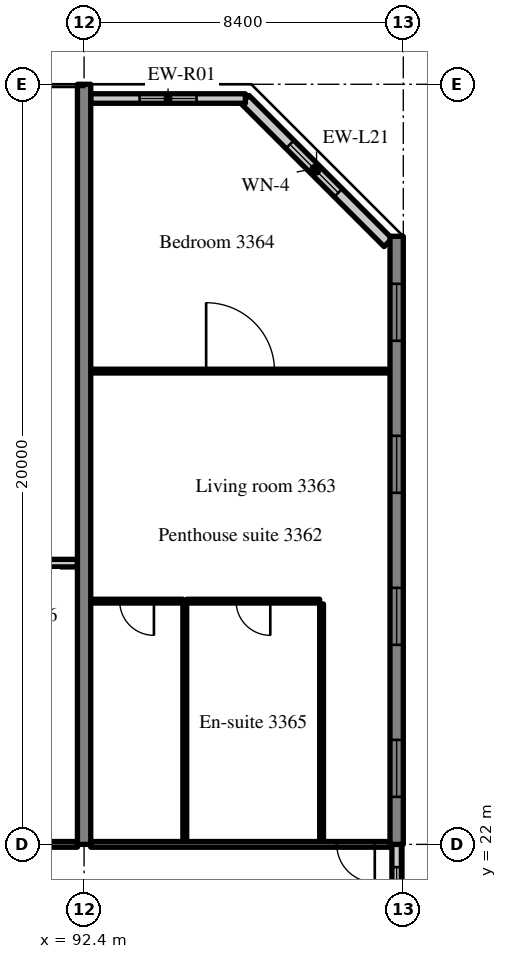
"""IFC4 building model, lengths in metres.
Left out: names, types, materials, properties, quantities, classifications, styles, units other than length and angle.
Written with IfcOpenShell. Run it as: python <this file> out.ifc"""

import sys

from ifc_helpers import new_model, si_unit, direction, frame, frame_2d, origin, place, context, subcontext, project, spatial, rectangle, extrude, source, transform, mapped, element, fill, save


model = new_model("IFC4")
c1 = context("Model", 3, precision=1e-05, world=origin(), true_north=direction((0.0, 1.0)))
c2 = subcontext(c1, "Body", "Model", "MODEL_VIEW")
j1 = project(units=[si_unit("LENGTHUNIT", "METRE"), si_unit("PLANEANGLEUNIT", "RADIAN")], contexts=[c1])
p1 = place(None, origin())
s1 = spatial("IfcSite", under=j1, at=p1, CompositionType="ELEMENT")
p2 = place(p1, origin())
s2 = spatial("IfcBuilding", under=s1, at=p2, CompositionType="ELEMENT")
p3 = place(p2, frame((0.0, 0.0, 137.0)))
s3 = spatial("IfcBuildingStorey", under=s2, at=p3, CompositionType="ELEMENT", Elevation=137.0)
m1 = source(origin(), c2, "Body", "SweptSolid", [
    extrude(rectangle(XDim=20.0, YDim=0.35, at=frame_2d((10.0, 0.0))), origin(), (0.0, 0.0, 1.0), 3.52),
])
p4 = place(p3, frame((92.4, 22.0, 0.0), z_axis=(0.0, 0.0, 1.0), x_axis=(0.0, 1.0, 0.0)))
e1 = element("IfcWall", 1, at=p4, inside=s3, PredefinedType="SHEAR", context=c2, shape_type="MappedRepresentation", body=[
    mapped(m1, transform((0.0, 0.0, 0.0), scale=1.0)),
])
m2 = source(origin(), c2, "Body", "SweptSolid", [
    extrude(rectangle(XDim=16.0, YDim=0.35, at=frame_2d((8.0, 0.0))), origin(), (0.0, 0.0, 1.0), 3.52),
])
p5 = place(p3, frame((100.625, 22.0, 0.0), z_axis=(0.0, 0.0, 1.0), x_axis=(0.0, 1.0, 0.0)))
e2 = element("IfcWall", 2, at=p5, inside=s3, PredefinedType="SHEAR", context=c2, shape_type="MappedRepresentation", body=[
    mapped(m2, transform((0.0, 0.0, 0.0), scale=1.0)),
])
m3 = source(origin(), c2, "Body", "SweptSolid", [
    extrude(rectangle(XDim=1.5, YDim=1.5, at=frame_2d((0.75, 0.75))), frame((0.0, 0.185, 0.0), z_axis=(0.0, -1.0, 0.0), x_axis=(1.0, 0.0, 0.0)), (0.0, 0.0, 1.0), 0.37),
])
p6 = place(p5, frame((1.25, 0.0, 0.9)))
e3 = element("IfcOpeningElement", 3, at=p6, cuts=e2, PredefinedType="OPENING", context=c2, shape_type="MappedRepresentation", body=[
    mapped(m3, transform((0.0, 0.0, 0.0), scale=1.0)),
])
p7 = place(p5, frame((5.25, 0.0, 0.9)))
e4 = element("IfcOpeningElement", 4, at=p7, cuts=e2, PredefinedType="OPENING", context=c2, shape_type="MappedRepresentation", body=[
    mapped(m3, transform((0.0, 0.0, 0.0), scale=1.0)),
])
p8 = place(p5, frame((9.25, 0.0, 0.9)))
e5 = element("IfcOpeningElement", 5, at=p8, cuts=e2, PredefinedType="OPENING", context=c2, shape_type="MappedRepresentation", body=[
    mapped(m3, transform((0.0, 0.0, 0.0), scale=1.0)),
])
p9 = place(p5, frame((13.25, 0.0, 0.9)))
e6 = element("IfcOpeningElement", 6, at=p9, cuts=e2, PredefinedType="OPENING", context=c2, shape_type="MappedRepresentation", body=[
    mapped(m3, transform((0.0, 0.0, 0.0), scale=1.0)),
])
m4 = source(origin(), c2, "Body", "SweptSolid", [
    extrude(rectangle(XDim=5.326, YDim=0.3, at=frame_2d((2.663, 0.0))), origin(), (0.0, 0.0, 1.0), 3.52),
])
p10 = place(p3, frame((100.4, 37.834, 0.0), z_axis=(0.0, 0.0, 1.0), x_axis=(-0.707083859269, 0.707129702361, 0.0)))
e7 = element("IfcWall", 7, at=p10, inside=s3, PredefinedType="SOLIDWALL", context=c2, shape_type="MappedRepresentation", body=[
    mapped(m4, transform((0.0, 0.0, 0.0), scale=1.0)),
])
m5 = source(origin(), c2, "Body", "SweptSolid", [
    extrude(rectangle(XDim=1.8, YDim=1.5, at=frame_2d((0.9, 0.75))), frame((0.0, 0.16, 0.0), z_axis=(0.0, -1.0, 0.0), x_axis=(1.0, 0.0, 0.0)), (0.0, 0.0, 1.0), 0.32),
])
p11 = place(p10, frame((1.854, 0.0, 0.9)))
e8 = element("IfcOpeningElement", 8, at=p11, cuts=e7, PredefinedType="OPENING", context=c2, shape_type="MappedRepresentation", body=[
    mapped(m5, transform((0.0, 0.0, 0.0), scale=1.0)),
])
m6 = source(origin(), c2, "Body", "SweptSolid", [
    extrude(rectangle(XDim=4.07, YDim=0.25, at=frame_2d((2.035, 0.0))), origin(), (0.0, 0.0, 1.0), 2.82),
])
p12 = place(p3, frame((96.645, 41.625, 0.0), z_axis=(0.0, 0.0, 1.0), x_axis=(-1.0, 0.0, 0.0)))
e9 = element("IfcWall", 9, at=p12, inside=s3, PredefinedType="SOLIDWALL", context=c2, shape_type="MappedRepresentation", body=[
    mapped(m6, transform((0.0, 0.0, 0.0), scale=1.0)),
])
m7 = source(origin(), c2, "Body", "SweptSolid", [
    extrude(rectangle(XDim=1.5, YDim=1.5, at=frame_2d((0.75, 0.75))), frame((0.0, 0.135, 0.0), z_axis=(0.0, -1.0, 0.0), x_axis=(1.0, 0.0, 0.0)), (0.0, 0.0, 1.0), 0.27),
])
p13 = place(p12, frame((1.285, 0.0, 0.9)))
e10 = element("IfcOpeningElement", 10, at=p13, cuts=e9, PredefinedType="OPENING", context=c2, shape_type="MappedRepresentation", body=[
    mapped(m7, transform((0.0, 0.0, 0.0), scale=1.0)),
])
m8 = source(origin(), c2, "Body", "SweptSolid", [
    extrude(rectangle(XDim=2.4, YDim=0.25, at=frame_2d((1.2, 0.0))), origin(), (0.0, 0.0, 1.0), 2.62),
])
p14 = place(p3, frame((100.625, 19.6, 0.0), z_axis=(0.0, 0.0, 1.0), x_axis=(0.0, 1.0, 0.0)))
e11 = element("IfcWall", 11, at=p14, inside=s3, PredefinedType="SOLIDWALL", context=c2, shape_type="MappedRepresentation", body=[
    mapped(m8, transform((0.0, 0.0, 0.0), scale=1.0)),
])
m9 = source(origin(), c2, "Body", "SweptSolid", [
    extrude(rectangle(XDim=1.2, YDim=1.5, at=frame_2d((0.6, 0.75))), frame((0.0, 0.135, 0.0), z_axis=(0.0, -1.0, 0.0), x_axis=(1.0, 0.0, 0.0)), (0.0, 0.0, 1.0), 0.27),
])
p15 = place(p14, frame((0.6, 0.0, 0.9)))
e12 = element("IfcOpeningElement", 12, at=p15, cuts=e11, PredefinedType="OPENING", context=c2, shape_type="MappedRepresentation", body=[
    mapped(m9, transform((0.0, 0.0, 0.0), scale=1.0)),
])
m10 = source(origin(), c2, "Body", "SweptSolid", [
    extrude(rectangle(XDim=8.05, YDim=0.15, at=frame_2d((4.025, 0.0))), origin(), (0.0, 0.0, 1.0), 2.82),
])
p16 = place(p3, frame((84.175, 22.0, 0.0), z_axis=(0.0, 0.0, 1.0), x_axis=(1.0, 0.0, 0.0)))
e13 = element("IfcWall", 13, at=p16, inside=s3, PredefinedType="PARTITIONING", context=c2, shape_type="MappedRepresentation", body=[
    mapped(m10, transform((0.0, 0.0, 0.0), scale=1.0)),
])
m11 = source(origin(), c2, "Body", "SweptSolid", [
    extrude(rectangle(XDim=1.8, YDim=2.1, at=frame_2d((0.9, 1.05))), frame((0.0, 0.085, 0.0), z_axis=(0.0, -1.0, 0.0), x_axis=(1.0, 0.0, 0.0)), (0.0, 0.0, 1.0), 0.17),
])
p17 = place(p16, frame((3.125, 0.0, 0.0)))
e14 = element("IfcOpeningElement", 14, at=p17, cuts=e13, PredefinedType="OPENING", context=c2, shape_type="MappedRepresentation", body=[
    mapped(m11, transform((0.0, 0.0, 0.0), scale=1.0)),
])
m12 = source(origin(), c2, "Body", "SweptSolid", [
    extrude(rectangle(XDim=8.05, YDim=0.2, at=frame_2d((4.025, 0.0))), origin(), (0.0, 0.0, 1.0), 3.52),
])
p18 = place(p3, frame((84.175, 29.4, 0.0), z_axis=(0.0, 0.0, 1.0), x_axis=(1.0, 0.0, 0.0)))
e15 = element("IfcWall", 15, at=p18, inside=s3, PredefinedType="PARTITIONING", context=c2, shape_type="MappedRepresentation", body=[
    mapped(m12, transform((0.0, 0.0, 0.0), scale=1.0)),
])
m13 = source(origin(), c2, "Body", "SweptSolid", [
    extrude(rectangle(XDim=6.25, YDim=0.1, at=frame_2d((3.125, 0.0))), origin(), (0.0, 0.0, 1.0), 3.52),
])
for number, where, z_axis, x_axis in (
    (16, (98.65, 22.075, 0.0), (0.0, 0.0, 1.0), (0.0, 1.0, 0.0)),
    (17, (95.05, 22.075, 0.0), (0.0, 0.0, 1.0), (0.0, 1.0, 0.0)),
):
    element("IfcWall", number, at=place(p3, frame(where, z_axis=z_axis, x_axis=x_axis)), inside=s3, PredefinedType="PARTITIONING", context=c2, shape_type="MappedRepresentation", body=[
        mapped(m13, transform((0.0, 0.0, 0.0), scale=1.0)),
    ])
m14 = source(origin(), c2, "Body", "SweptSolid", [
    extrude(rectangle(XDim=3.5, YDim=0.1, at=frame_2d((1.75, 0.0))), origin(), (0.0, 0.0, 1.0), 3.52),
])
p19 = place(p3, frame((95.1, 28.4, 0.0), z_axis=(0.0, 0.0, 1.0), x_axis=(1.0, 0.0, 0.0)))
e18 = element("IfcWall", 18, at=p19, inside=s3, PredefinedType="PARTITIONING", context=c2, shape_type="MappedRepresentation", body=[
    mapped(m14, transform((0.0, 0.0, 0.0), scale=1.0)),
])
m15 = source(origin(), c2, "Body", "SweptSolid", [
    extrude(rectangle(XDim=0.9, YDim=2.1, at=frame_2d((0.45, 1.05))), frame((0.0, 0.06, 0.0), z_axis=(0.0, -1.0, 0.0), x_axis=(1.0, 0.0, 0.0)), (0.0, 0.0, 1.0), 0.12),
])
p20 = place(p19, frame((1.3, 0.0, 0.0)))
e19 = element("IfcOpeningElement", 19, at=p20, cuts=e18, PredefinedType="OPENING", context=c2, shape_type="MappedRepresentation", body=[
    mapped(m15, transform((0.0, 0.0, 0.0), scale=1.0)),
])
m16 = source(origin(), c2, "Body", "SweptSolid", [
    extrude(rectangle(XDim=2.425, YDim=0.1, at=frame_2d((1.212, 0.0))), origin(), (0.0, 0.0, 1.0), 3.52),
])
p21 = place(p3, frame((92.575, 28.4, 0.0), z_axis=(0.0, 0.0, 1.0), x_axis=(1.0, 0.0, 0.0)))
e20 = element("IfcWall", 20, at=p21, inside=s3, PredefinedType="PARTITIONING", context=c2, shape_type="MappedRepresentation", body=[
    mapped(m16, transform((0.0, 0.0, 0.0), scale=1.0)),
])
p22 = place(p21, frame((0.763, 0.0, 0.0)))
e21 = element("IfcOpeningElement", 21, at=p22, cuts=e20, PredefinedType="OPENING", context=c2, shape_type="MappedRepresentation", body=[
    mapped(m15, transform((0.0, 0.0, 0.0), scale=1.0)),
])
m17 = source(origin(), c2, "Body", "SweptSolid", [
    extrude(rectangle(XDim=7.875, YDim=0.1, at=frame_2d((3.938, 0.0))), origin(), (0.0, 0.0, 1.0), 3.52),
])
p23 = place(p3, frame((92.575, 34.453, 0.0), z_axis=(0.0, 0.0, 1.0), x_axis=(1.0, 0.0, 0.0)))
e22 = element("IfcWall", 22, at=p23, inside=s3, PredefinedType="PARTITIONING", context=c2, shape_type="MappedRepresentation", body=[
    mapped(m17, transform((0.0, 0.0, 0.0), scale=1.0)),
])
m18 = source(origin(), c2, "Body", "SweptSolid", [
    extrude(rectangle(XDim=1.8, YDim=2.1, at=frame_2d((0.9, 1.05))), frame((0.0, 0.06, 0.0), z_axis=(0.0, -1.0, 0.0), x_axis=(1.0, 0.0, 0.0)), (0.0, 0.0, 1.0), 0.12),
])
p24 = place(p23, frame((3.037, 0.0, 0.0)))
e23 = element("IfcOpeningElement", 23, at=p24, cuts=e22, PredefinedType="OPENING", context=c2, shape_type="MappedRepresentation", body=[
    mapped(m18, transform((0.0, 0.0, 0.0), scale=1.0)),
])
m19 = source(origin(), c2, "Body", "SweptSolid", [
    extrude(rectangle(XDim=7.875, YDim=0.15, at=frame_2d((3.938, 0.0))), origin(), (0.0, 0.0, 1.0), 2.82),
])
p25 = place(p3, frame((92.575, 22.0, 0.0), z_axis=(0.0, 0.0, 1.0), x_axis=(1.0, 0.0, 0.0)))
e24 = element("IfcWall", 24, at=p25, inside=s3, PredefinedType="PARTITIONING", context=c2, shape_type="MappedRepresentation", body=[
    mapped(m19, transform((0.0, 0.0, 0.0), scale=1.0)),
])
m20 = source(origin(), c2, "Body", "SweptSolid", [
    extrude(rectangle(XDim=1.0, YDim=2.1, at=frame_2d((0.5, 1.05))), frame((0.0, 0.085, 0.0), z_axis=(0.0, -1.0, 0.0), x_axis=(1.0, 0.0, 0.0)), (0.0, 0.0, 1.0), 0.17),
])
p26 = place(p25, frame((6.475, 0.0, 0.0)))
e25 = element("IfcOpeningElement", 25, at=p26, cuts=e24, PredefinedType="OPENING", context=c2, shape_type="MappedRepresentation", body=[
    mapped(m20, transform((0.0, 0.0, 0.0), scale=1.0)),
])
m21 = source(origin(), c2, "Body", "SweptSolid", [
    extrude(rectangle(XDim=1.8, YDim=1.5, at=frame_2d((0.9, 0.75))), frame((0.0, 0.03, 0.0), z_axis=(0.0, -1.0, 0.0), x_axis=(1.0, 0.0, 0.0)), (0.0, 0.0, 1.0), 0.06),
])
p27 = place(p11, origin())
e26 = element("IfcWindow", 26, at=p27, inside=s3, PartitioningType="SINGLE_PANEL", PredefinedType="WINDOW", context=c2, shape_type="MappedRepresentation", body=[
    mapped(m21, transform((0.0, 0.0, 0.0), scale=1.0)),
])
fill(e8, e26)
m22 = source(origin(), c2, "Body", "SweptSolid", [
    extrude(rectangle(XDim=1.5, YDim=1.5, at=frame_2d((0.75, 0.75))), frame((0.0, 0.03, 0.0), z_axis=(0.0, -1.0, 0.0), x_axis=(1.0, 0.0, 0.0)), (0.0, 0.0, 1.0), 0.06),
])
p28 = place(p13, origin())
e27 = element("IfcWindow", 27, at=p28, inside=s3, PartitioningType="SINGLE_PANEL", PredefinedType="WINDOW", context=c2, shape_type="MappedRepresentation", body=[
    mapped(m22, transform((0.0, 0.0, 0.0), scale=1.0)),
])
fill(e10, e27)
p29 = place(p6, origin())
e28 = element("IfcWindow", 28, at=p29, inside=s3, PartitioningType="SINGLE_PANEL", PredefinedType="WINDOW", context=c2, shape_type="MappedRepresentation", body=[
    mapped(m22, transform((0.0, 0.0, 0.0), scale=1.0)),
])
fill(e3, e28)
p30 = place(p7, origin())
e29 = element("IfcWindow", 29, at=p30, inside=s3, PartitioningType="SINGLE_PANEL", PredefinedType="WINDOW", context=c2, shape_type="MappedRepresentation", body=[
    mapped(m22, transform((0.0, 0.0, 0.0), scale=1.0)),
])
fill(e4, e29)
p31 = place(p8, origin())
e30 = element("IfcWindow", 30, at=p31, inside=s3, PartitioningType="SINGLE_PANEL", PredefinedType="WINDOW", context=c2, shape_type="MappedRepresentation", body=[
    mapped(m22, transform((0.0, 0.0, 0.0), scale=1.0)),
])
fill(e5, e30)
p32 = place(p9, origin())
e31 = element("IfcWindow", 31, at=p32, inside=s3, PartitioningType="SINGLE_PANEL", PredefinedType="WINDOW", context=c2, shape_type="MappedRepresentation", body=[
    mapped(m22, transform((0.0, 0.0, 0.0), scale=1.0)),
])
fill(e6, e31)
m23 = source(origin(), c2, "Body", "SweptSolid", [
    extrude(rectangle(XDim=1.2, YDim=1.5, at=frame_2d((0.6, 0.75))), frame((0.0, 0.03, 0.0), z_axis=(0.0, -1.0, 0.0), x_axis=(1.0, 0.0, 0.0)), (0.0, 0.0, 1.0), 0.06),
])
p33 = place(p15, origin())
e32 = element("IfcWindow", 32, at=p33, inside=s3, PartitioningType="SINGLE_PANEL", PredefinedType="WINDOW", context=c2, shape_type="MappedRepresentation", body=[
    mapped(m23, transform((0.0, 0.0, 0.0), scale=1.0)),
])
fill(e12, e32)
m24 = source(origin(), c2, "Body", "SweptSolid", [
    extrude(rectangle(XDim=0.9, YDim=2.1, at=frame_2d((0.45, 1.05))), frame((0.0, 0.025, 0.0), z_axis=(0.0, -1.0, 0.0), x_axis=(1.0, 0.0, 0.0)), (0.0, 0.0, 1.0), 0.05),
])
p34 = place(p20, origin())
e33 = element("IfcDoor", 33, at=p34, inside=s3, OperationType="SINGLE_SWING_RIGHT", PredefinedType="DOOR", context=c2, shape_type="MappedRepresentation", body=[
    mapped(m24, transform((0.0, 0.0, 0.0), scale=1.0)),
])
fill(e19, e33)
p35 = place(p22, origin())
e34 = element("IfcDoor", 34, at=p35, inside=s3, OperationType="SINGLE_SWING_RIGHT", PredefinedType="DOOR", context=c2, shape_type="MappedRepresentation", body=[
    mapped(m24, transform((0.0, 0.0, 0.0), scale=1.0)),
])
fill(e21, e34)
m25 = source(origin(), c2, "Body", "SweptSolid", [
    extrude(rectangle(XDim=1.8, YDim=2.1, at=frame_2d((0.9, 1.05))), frame((0.0, 0.025, 0.0), z_axis=(0.0, -1.0, 0.0), x_axis=(1.0, 0.0, 0.0)), (0.0, 0.0, 1.0), 0.05),
])
p36 = place(p24, origin())
e35 = element("IfcDoor", 35, at=p36, inside=s3, OperationType="DOUBLE_DOOR_SINGLE_SWING", PredefinedType="DOOR", context=c2, shape_type="MappedRepresentation", body=[
    mapped(m25, transform((0.0, 0.0, 0.0), scale=1.0)),
])
fill(e23, e35)
m26 = source(origin(), c2, "Body", "SweptSolid", [
    extrude(rectangle(XDim=1.0, YDim=2.1, at=frame_2d((0.5, 1.05))), frame((0.0, 0.025, 0.0), z_axis=(0.0, -1.0, 0.0), x_axis=(1.0, 0.0, 0.0)), (0.0, 0.0, 1.0), 0.05),
])
p37 = place(p26, origin())
e36 = element("IfcDoor", 36, at=p37, inside=s3, OperationType="SINGLE_SWING_RIGHT", PredefinedType="DOOR", context=c2, shape_type="MappedRepresentation", body=[
    mapped(m26, transform((0.0, 0.0, 0.0), scale=1.0)),
])
fill(e25, e36)
save(model, sys.argv[1])
